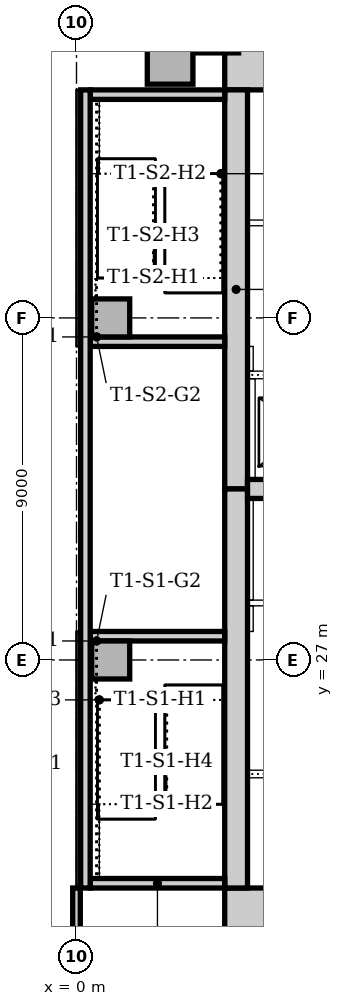
"""IFC4 building model, lengths in metres.
Left out: names, types, materials, properties, quantities, classifications, styles, units other than length and angle.
Written with IfcOpenShell. Run it as: python <this file> out.ifc"""

import sys

from ifc_helpers import new_model, si_unit, direction, frame, frame_2d, origin, origin_2d, place, context, subcontext, project, spatial, rectangle, extrude, element, fill, save


model = new_model("IFC4")
c1 = context("Model", 3, precision=1e-05, world=origin(), true_north=direction((0.0, 1.0)))
c2 = subcontext(c1, "Body", "Model", "MODEL_VIEW")
j1 = project(units=[si_unit("LENGTHUNIT", "METRE"), si_unit("PLANEANGLEUNIT", "RADIAN")], contexts=[c1])
p1 = place(None, origin())
s1 = spatial("IfcSite", under=j1, at=p1, CompositionType="ELEMENT")
p2 = place(p1, origin())
s2 = spatial("IfcBuilding", under=s1, at=p2, CompositionType="ELEMENT")
p3 = place(p2, frame((0.0, 0.0, 6.0)))
s3 = spatial("IfcBuildingStorey", under=s2, at=p3, CompositionType="ELEMENT", Elevation=6.0)
for number, where, z_axis, x_axis in (
    (1, (3.9, 20.4, 0.0), (0.0, 0.0, 1.0), (1.0, 0.0, 0.0)),
    (2, (23.7, 42.6, 0.0), (0.0, 0.0, 1.0), (-1.0, 0.0, 0.0)),
):
    element("IfcWall", number, at=place(p3, frame(where, z_axis=z_axis, x_axis=x_axis)), inside=s3, PredefinedType="SOLIDWALL", context=c2, shape_type="SweptSolid", body=[
        extrude(rectangle(XDim=19.8, YDim=1.2, at=frame_2d((9.9, 0.0))), origin(), (0.0, 0.0, 1.0), 5.0),
    ])
p4 = place(p3, frame((4.2, 42.0, 0.0), z_axis=(0.0, 0.0, 1.0), x_axis=(0.0, -1.0, 0.0)))
e3 = element("IfcWall", 3, at=p4, inside=s3, PredefinedType="SOLIDWALL", context=c2, shape_type="SweptSolid", body=[
    extrude(rectangle(XDim=10.5, YDim=0.6, at=frame_2d((5.25, 0.0))), origin(), (0.0, 0.0, 1.0), 5.0),
])
p5 = place(p4, frame((5.3, 0.0, 0.0)))
e4 = element("IfcOpeningElement", 4, at=p5, cuts=e3, PredefinedType="OPENING", context=c2, shape_type="SweptSolid", body=[
    extrude(rectangle(XDim=1.0, YDim=2.1, at=frame_2d((0.5, 1.05))), frame((0.0, 0.31, 0.0), z_axis=(0.0, -1.0, 0.0), x_axis=(1.0, 0.0, 0.0)), (0.0, 0.0, 1.0), 0.62),
])
p6 = place(p3, frame((4.2, 31.5, 0.0), z_axis=(0.0, 0.0, 1.0), x_axis=(0.0, -1.0, 0.0)))
e5 = element("IfcWall", 5, at=p6, inside=s3, PredefinedType="SOLIDWALL", context=c2, shape_type="SweptSolid", body=[
    extrude(rectangle(XDim=10.5, YDim=0.6, at=frame_2d((5.25, 0.0))), origin(), (0.0, 0.0, 1.0), 5.0),
])
p7 = place(p6, frame((4.25, 0.0, 0.0)))
e6 = element("IfcOpeningElement", 6, at=p7, cuts=e5, PredefinedType="OPENING", context=c2, shape_type="SweptSolid", body=[
    extrude(rectangle(XDim=1.0, YDim=2.1, at=frame_2d((0.5, 1.05))), frame((0.0, 0.31, 0.0), z_axis=(0.0, -1.0, 0.0), x_axis=(1.0, 0.0, 0.0)), (0.0, 0.0, 1.0), 0.62),
])
p8 = place(p3, frame((4.5, 31.5, 0.0), z_axis=(0.0, 0.0, 1.0), x_axis=(1.0, 0.0, 0.0)))
e7 = element("IfcWall", 7, at=p8, inside=s3, PredefinedType="SOLIDWALL", context=c2, shape_type="SweptSolid", body=[
    extrude(rectangle(XDim=18.0, YDim=0.5, at=frame_2d((9.0, 0.0))), origin(), (0.0, 0.0, 1.0), 5.0),
])
p9 = place(p3, frame((0.36, 21.125, 0.0), z_axis=(0.0, 0.0, 1.0), x_axis=(1.0, 0.0, 0.0)))
e8 = element("IfcWall", 8, at=p9, inside=s3, PredefinedType="SOLIDWALL", context=c2, shape_type="SweptSolid", body=[
    extrude(rectangle(XDim=3.54, YDim=0.25, at=frame_2d((1.77, 0.0))), origin(), (0.0, 0.0, 1.0), 5.0),
])
p10 = place(p3, frame((3.9, 27.625, 0.0), z_axis=(0.0, 0.0, 1.0), x_axis=(-1.0, 0.0, 0.0)))
e9 = element("IfcWall", 9, at=p10, inside=s3, PredefinedType="SOLIDWALL", context=c2, shape_type="SweptSolid", body=[
    extrude(rectangle(XDim=3.54, YDim=0.25, at=frame_2d((1.77, 0.0))), origin(), (0.0, 0.0, 1.0), 5.0),
])
p11 = place(p10, frame((0.4, 0.0, 0.0)))
e10 = element("IfcOpeningElement", 10, at=p11, cuts=e9, PredefinedType="OPENING", context=c2, shape_type="SweptSolid", body=[
    extrude(rectangle(XDim=1.0, YDim=2.1, at=frame_2d((0.5, 1.05))), frame((0.0, 0.135, 0.0), z_axis=(0.0, -1.0, 0.0), x_axis=(1.0, 0.0, 0.0)), (0.0, 0.0, 1.0), 0.27),
])
p12 = place(p3, frame((0.36, 35.375, 0.0), z_axis=(0.0, 0.0, 1.0), x_axis=(1.0, 0.0, 0.0)))
e11 = element("IfcWall", 11, at=p12, inside=s3, PredefinedType="SOLIDWALL", context=c2, shape_type="SweptSolid", body=[
    extrude(rectangle(XDim=3.54, YDim=0.25, at=frame_2d((1.77, 0.0))), origin(), (0.0, 0.0, 1.0), 5.0),
])
p13 = place(p12, frame((2.14, 0.0, 0.0)))
e12 = element("IfcOpeningElement", 12, at=p13, cuts=e11, PredefinedType="OPENING", context=c2, shape_type="SweptSolid", body=[
    extrude(rectangle(XDim=1.0, YDim=2.1, at=frame_2d((0.5, 1.05))), frame((0.0, 0.135, 0.0), z_axis=(0.0, -1.0, 0.0), x_axis=(1.0, 0.0, 0.0)), (0.0, 0.0, 1.0), 0.27),
])
p14 = place(p3, frame((3.9, 41.875, 0.0), z_axis=(0.0, 0.0, 1.0), x_axis=(-1.0, 0.0, 0.0)))
e13 = element("IfcWall", 13, at=p14, inside=s3, PredefinedType="SOLIDWALL", context=c2, shape_type="SweptSolid", body=[
    extrude(rectangle(XDim=3.54, YDim=0.25, at=frame_2d((1.77, 0.0))), origin(), (0.0, 0.0, 1.0), 5.0),
])
p15 = place(p3, frame((0.235, 21.0, 0.0), z_axis=(0.0, 0.0, 1.0), x_axis=(0.0, 1.0, 0.0)))
e14 = element("IfcWall", 14, at=p15, inside=s3, PredefinedType="SOLIDWALL", context=c2, shape_type="SweptSolid", body=[
    extrude(rectangle(XDim=21.0, YDim=0.25, at=frame_2d((10.5, 0.0))), origin(), (0.0, 0.0, 1.0), 5.0),
])
for number, where, z_axis, x_axis in (
    (15, (3.667, 43.574, 0.0), (0.0, 0.0, 1.0), (1.0, 0.0, 0.0)),
    (16, (2.463, 42.75, 0.0), (0.0, 0.0, 1.0), (1.0, 0.0, 0.0)),
):
    element("IfcColumn", number, at=place(p3, frame(where, z_axis=z_axis, x_axis=x_axis)), inside=s3, PredefinedType="COLUMN", context=c2, shape_type="SweptSolid", body=[
        extrude(rectangle(XDim=1.2, YDim=1.2, at=origin_2d()), origin(), (0.0, 0.0, 1.0), 4.7),
    ])
for number, where, z_axis, x_axis in (
    (17, (0.9, 27.0, 0.0), (0.0, 0.0, 1.0), (1.0, 0.0, 0.0)),
    (18, (0.9, 36.0, 0.0), (0.0, 0.0, 1.0), (1.0, 0.0, 0.0)),
):
    element("IfcColumn", number, at=place(p3, frame(where, z_axis=z_axis, x_axis=x_axis)), inside=s3, PredefinedType="COLUMN", context=c2, shape_type="SweptSolid", body=[
        extrude(rectangle(XDim=1.0, YDim=1.0, at=origin_2d()), origin(), (0.0, 0.0, 1.0), 5.0),
    ])
p16 = place(p3, frame((0.0, 3.7, 0.0), z_axis=(0.0, 0.0, 1.0), x_axis=(0.0, 1.0, 0.0)))
e19 = element("IfcWall", 19, at=p16, inside=s3, PredefinedType="PARTITIONING", context=c2, shape_type="SweptSolid", body=[
    extrude(rectangle(XDim=17.3, YDim=0.2, at=frame_2d((8.65, 0.0))), origin(), (0.0, 0.0, 1.0), 4.7),
])
p17 = place(p16, frame((8.1, 0.0, 0.0)))
e20 = element("IfcOpeningElement", 20, at=p17, cuts=e19, PredefinedType="OPENING", context=c2, shape_type="SweptSolid", body=[
    extrude(rectangle(XDim=1.0, YDim=2.1, at=frame_2d((0.5, 1.05))), frame((0.0, 0.11, 0.0), z_axis=(0.0, -1.0, 0.0), x_axis=(1.0, 0.0, 0.0)), (0.0, 0.0, 1.0), 0.22),
])
for number, where, z_axis, x_axis in (
    (21, (0.48, 21.25, 0.0), (0.0, 0.0, 1.0), (0.0, 1.0, 0.0)),
    (22, (0.48, 39.795, 0.0), (0.0, 0.0, 1.0), (0.0, 1.0, 0.0)),
):
    element("IfcWall", number, at=place(p3, frame(where, z_axis=z_axis, x_axis=x_axis)), inside=s3, PredefinedType="STANDARD", context=c2, shape_type="SweptSolid", body=[
        extrude(rectangle(XDim=1.955, YDim=0.24, at=frame_2d((0.978, 0.0))), origin(), (0.0, 0.0, 1.0), 5.0),
    ])
p18 = place(p3, frame((4.5, 24.0, 0.0), z_axis=(0.0, 0.0, 1.0), x_axis=(1.0, 0.0, 0.0)))
e23 = element("IfcWall", 23, at=p18, inside=s3, PredefinedType="PARTITIONING", context=c2, shape_type="SweptSolid", body=[
    extrude(rectangle(XDim=18.0, YDim=0.2, at=frame_2d((9.0, 0.0))), origin(), (0.0, 0.0, 1.0), 4.7),
])
p19 = place(p18, frame((0.95, 0.0, 0.0)))
e24 = element("IfcOpeningElement", 24, at=p19, cuts=e23, PredefinedType="OPENING", context=c2, shape_type="SweptSolid", body=[
    extrude(rectangle(XDim=1.1, YDim=2.1, at=frame_2d((0.55, 1.05))), frame((0.0, 0.11, 0.0), z_axis=(0.0, -1.0, 0.0), x_axis=(1.0, 0.0, 0.0)), (0.0, 0.0, 1.0), 0.22),
])
p20 = place(p18, frame((3.95, 0.0, 0.0)))
e25 = element("IfcOpeningElement", 25, at=p20, cuts=e23, PredefinedType="OPENING", context=c2, shape_type="SweptSolid", body=[
    extrude(rectangle(XDim=1.1, YDim=2.1, at=frame_2d((0.55, 1.05))), frame((0.0, 0.11, 0.0), z_axis=(0.0, -1.0, 0.0), x_axis=(1.0, 0.0, 0.0)), (0.0, 0.0, 1.0), 0.22),
])
p21 = place(p18, frame((6.95, 0.0, 0.0)))
e26 = element("IfcOpeningElement", 26, at=p21, cuts=e23, PredefinedType="OPENING", context=c2, shape_type="SweptSolid", body=[
    extrude(rectangle(XDim=1.1, YDim=2.1, at=frame_2d((0.55, 1.05))), frame((0.0, 0.11, 0.0), z_axis=(0.0, -1.0, 0.0), x_axis=(1.0, 0.0, 0.0)), (0.0, 0.0, 1.0), 0.22),
])
p22 = place(p18, frame((9.95, 0.0, 0.0)))
e27 = element("IfcOpeningElement", 27, at=p22, cuts=e23, PredefinedType="OPENING", context=c2, shape_type="SweptSolid", body=[
    extrude(rectangle(XDim=1.1, YDim=2.1, at=frame_2d((0.55, 1.05))), frame((0.0, 0.11, 0.0), z_axis=(0.0, -1.0, 0.0), x_axis=(1.0, 0.0, 0.0)), (0.0, 0.0, 1.0), 0.22),
])
p23 = place(p18, frame((12.95, 0.0, 0.0)))
e28 = element("IfcOpeningElement", 28, at=p23, cuts=e23, PredefinedType="OPENING", context=c2, shape_type="SweptSolid", body=[
    extrude(rectangle(XDim=1.1, YDim=2.1, at=frame_2d((0.55, 1.05))), frame((0.0, 0.11, 0.0), z_axis=(0.0, -1.0, 0.0), x_axis=(1.0, 0.0, 0.0)), (0.0, 0.0, 1.0), 0.22),
])
p24 = place(p18, frame((15.95, 0.0, 0.0)))
e29 = element("IfcOpeningElement", 29, at=p24, cuts=e23, PredefinedType="OPENING", context=c2, shape_type="SweptSolid", body=[
    extrude(rectangle(XDim=1.1, YDim=2.1, at=frame_2d((0.55, 1.05))), frame((0.0, 0.11, 0.0), z_axis=(0.0, -1.0, 0.0), x_axis=(1.0, 0.0, 0.0)), (0.0, 0.0, 1.0), 0.22),
])
p25 = place(p3, frame((4.5, 34.5, 0.0), z_axis=(0.0, 0.0, 1.0), x_axis=(1.0, 0.0, 0.0)))
e30 = element("IfcWall", 30, at=p25, inside=s3, PredefinedType="PARTITIONING", context=c2, shape_type="SweptSolid", body=[
    extrude(rectangle(XDim=18.0, YDim=0.2, at=frame_2d((9.0, 0.0))), origin(), (0.0, 0.0, 1.0), 4.7),
])
p26 = place(p25, frame((0.95, 0.0, 0.0)))
e31 = element("IfcOpeningElement", 31, at=p26, cuts=e30, PredefinedType="OPENING", context=c2, shape_type="SweptSolid", body=[
    extrude(rectangle(XDim=1.1, YDim=2.1, at=frame_2d((0.55, 1.05))), frame((0.0, 0.11, 0.0), z_axis=(0.0, -1.0, 0.0), x_axis=(1.0, 0.0, 0.0)), (0.0, 0.0, 1.0), 0.22),
])
p27 = place(p25, frame((3.95, 0.0, 0.0)))
e32 = element("IfcOpeningElement", 32, at=p27, cuts=e30, PredefinedType="OPENING", context=c2, shape_type="SweptSolid", body=[
    extrude(rectangle(XDim=1.1, YDim=2.1, at=frame_2d((0.55, 1.05))), frame((0.0, 0.11, 0.0), z_axis=(0.0, -1.0, 0.0), x_axis=(1.0, 0.0, 0.0)), (0.0, 0.0, 1.0), 0.22),
])
p28 = place(p25, frame((12.95, 0.0, 0.0)))
e33 = element("IfcOpeningElement", 33, at=p28, cuts=e30, PredefinedType="OPENING", context=c2, shape_type="SweptSolid", body=[
    extrude(rectangle(XDim=1.1, YDim=2.1, at=frame_2d((0.55, 1.05))), frame((0.0, 0.11, 0.0), z_axis=(0.0, -1.0, 0.0), x_axis=(1.0, 0.0, 0.0)), (0.0, 0.0, 1.0), 0.22),
])
p29 = place(p25, frame((15.95, 0.0, 0.0)))
e34 = element("IfcOpeningElement", 34, at=p29, cuts=e30, PredefinedType="OPENING", context=c2, shape_type="SweptSolid", body=[
    extrude(rectangle(XDim=1.1, YDim=2.1, at=frame_2d((0.55, 1.05))), frame((0.0, 0.11, 0.0), z_axis=(0.0, -1.0, 0.0), x_axis=(1.0, 0.0, 0.0)), (0.0, 0.0, 1.0), 0.22),
])
p30 = place(p3, frame((4.6, 31.75, 0.0), z_axis=(0.0, 0.0, 1.0), x_axis=(0.0, 1.0, 0.0)))
e35 = element("IfcWall", 35, at=p30, inside=s3, PredefinedType="PARTITIONING", context=c2, shape_type="SweptSolid", body=[
    extrude(rectangle(XDim=2.65, YDim=0.2, at=frame_2d((1.325, 0.0))), origin(), (0.0, 0.0, 1.0), 4.7),
])
p31 = place(p3, frame((4.5, 28.5, 0.0), z_axis=(0.0, 0.0, 1.0), x_axis=(1.0, 0.0, 0.0)))
e36 = element("IfcWall", 36, at=p31, inside=s3, PredefinedType="PARTITIONING", context=c2, shape_type="SweptSolid", body=[
    extrude(rectangle(XDim=18.0, YDim=0.15, at=frame_2d((9.0, 0.0))), origin(), (0.0, 0.0, 1.0), 4.7),
])
p32 = place(p31, frame((4.1, 0.0, 0.0)))
e37 = element("IfcOpeningElement", 37, at=p32, cuts=e36, PredefinedType="OPENING", context=c2, shape_type="SweptSolid", body=[
    extrude(rectangle(XDim=0.9, YDim=2.1, at=frame_2d((0.45, 1.05))), frame((0.0, 0.085, 0.0), z_axis=(0.0, -1.0, 0.0), x_axis=(1.0, 0.0, 0.0)), (0.0, 0.0, 1.0), 0.17),
])
p33 = place(p31, frame((10.8, 0.0, 0.0)))
e38 = element("IfcOpeningElement", 38, at=p33, cuts=e36, PredefinedType="OPENING", context=c2, shape_type="SweptSolid", body=[
    extrude(rectangle(XDim=0.9, YDim=2.1, at=frame_2d((0.45, 1.05))), frame((0.0, 0.085, 0.0), z_axis=(0.0, -1.0, 0.0), x_axis=(1.0, 0.0, 0.0)), (0.0, 0.0, 1.0), 0.17),
])
p34 = place(p31, frame((15.2, 0.0, 0.0)))
e39 = element("IfcOpeningElement", 39, at=p34, cuts=e36, PredefinedType="OPENING", context=c2, shape_type="SweptSolid", body=[
    extrude(rectangle(XDim=0.9, YDim=2.1, at=frame_2d((0.45, 1.05))), frame((0.0, 0.085, 0.0), z_axis=(0.0, -1.0, 0.0), x_axis=(1.0, 0.0, 0.0)), (0.0, 0.0, 1.0), 0.17),
])
p35 = place(p3, frame((4.5, 38.5, 0.0), z_axis=(0.0, 0.0, 1.0), x_axis=(1.0, 0.0, 0.0)))
e40 = element("IfcWall", 40, at=p35, inside=s3, PredefinedType="PARTITIONING", context=c2, shape_type="SweptSolid", body=[
    extrude(rectangle(XDim=11.9, YDim=0.15, at=frame_2d((5.95, 0.0))), origin(), (0.0, 0.0, 1.0), 4.7),
])
p36 = place(p35, frame((1.1, 0.0, 0.0)))
e41 = element("IfcOpeningElement", 41, at=p36, cuts=e40, PredefinedType="OPENING", context=c2, shape_type="SweptSolid", body=[
    extrude(rectangle(XDim=0.9, YDim=2.1, at=frame_2d((0.45, 1.05))), frame((0.0, 0.085, 0.0), z_axis=(0.0, -1.0, 0.0), x_axis=(1.0, 0.0, 0.0)), (0.0, 0.0, 1.0), 0.17),
])
p37 = place(p35, frame((4.05, 0.0, 0.0)))
e42 = element("IfcOpeningElement", 42, at=p37, cuts=e40, PredefinedType="OPENING", context=c2, shape_type="SweptSolid", body=[
    extrude(rectangle(XDim=0.9, YDim=2.1, at=frame_2d((0.45, 1.05))), frame((0.0, 0.085, 0.0), z_axis=(0.0, -1.0, 0.0), x_axis=(1.0, 0.0, 0.0)), (0.0, 0.0, 1.0), 0.17),
])
p38 = place(p35, frame((7.05, 0.0, 0.0)))
e43 = element("IfcOpeningElement", 43, at=p38, cuts=e40, PredefinedType="OPENING", context=c2, shape_type="SweptSolid", body=[
    extrude(rectangle(XDim=0.9, YDim=2.1, at=frame_2d((0.45, 1.05))), frame((0.0, 0.085, 0.0), z_axis=(0.0, -1.0, 0.0), x_axis=(1.0, 0.0, 0.0)), (0.0, 0.0, 1.0), 0.17),
])
p39 = place(p35, frame((9.95, 0.0, 0.0)))
e44 = element("IfcOpeningElement", 44, at=p39, cuts=e40, PredefinedType="OPENING", context=c2, shape_type="SweptSolid", body=[
    extrude(rectangle(XDim=0.8, YDim=2.1, at=frame_2d((0.4, 1.05))), frame((0.0, 0.085, 0.0), z_axis=(0.0, -1.0, 0.0), x_axis=(1.0, 0.0, 0.0)), (0.0, 0.0, 1.0), 0.17),
])
p40 = place(p3, frame((4.575, 27.75, 0.0), z_axis=(0.0, 0.0, 1.0), x_axis=(0.0, 1.0, 0.0)))
e45 = element("IfcWall", 45, at=p40, inside=s3, PredefinedType="PARTITIONING", context=c2, shape_type="SweptSolid", body=[
    extrude(rectangle(XDim=0.675, YDim=0.15, at=frame_2d((0.338, 0.0))), origin(), (0.0, 0.0, 1.0), 4.7),
])
p41 = place(p3, frame((4.575, 28.575, 0.0), z_axis=(0.0, 0.0, 1.0), x_axis=(0.0, 1.0, 0.0)))
e46 = element("IfcWall", 46, at=p41, inside=s3, PredefinedType="PARTITIONING", context=c2, shape_type="SweptSolid", body=[
    extrude(rectangle(XDim=2.675, YDim=0.15, at=frame_2d((1.337, 0.0))), origin(), (0.0, 0.0, 1.0), 4.7),
])
p42 = place(p3, frame((4.575, 34.6, 0.0), z_axis=(0.0, 0.0, 1.0), x_axis=(0.0, 1.0, 0.0)))
e47 = element("IfcWall", 47, at=p42, inside=s3, PredefinedType="PARTITIONING", context=c2, shape_type="SweptSolid", body=[
    extrude(rectangle(XDim=0.65, YDim=0.15, at=frame_2d((0.325, 0.0))), origin(), (0.0, 0.0, 1.0), 4.7),
])
p43 = place(p7, frame((1.0, 0.0, 0.0), z_axis=(0.0, 0.0, 1.0), x_axis=(-1.0, 0.0, 0.0)))
e48 = element("IfcDoor", 48, at=p43, inside=s3, OperationType="SINGLE_SWING_RIGHT", PredefinedType="DOOR", context=c2, shape_type="SweptSolid", body=[
    extrude(rectangle(XDim=1.0, YDim=2.1, at=frame_2d((0.5, 1.05))), frame((0.0, 0.025, 0.0), z_axis=(0.0, -1.0, 0.0), x_axis=(1.0, 0.0, 0.0)), (0.0, 0.0, 1.0), 0.05),
])
fill(e6, e48)
p44 = place(p11, origin())
e49 = element("IfcDoor", 49, at=p44, inside=s3, OperationType="SINGLE_SWING_LEFT", PredefinedType="DOOR", context=c2, shape_type="SweptSolid", body=[
    extrude(rectangle(XDim=1.0, YDim=2.1, at=frame_2d((0.5, 1.05))), frame((0.0, 0.025, 0.0), z_axis=(0.0, -1.0, 0.0), x_axis=(1.0, 0.0, 0.0)), (0.0, 0.0, 1.0), 0.05),
])
fill(e10, e49)
p45 = place(p5, frame((1.0, 0.0, 0.0), z_axis=(0.0, 0.0, 1.0), x_axis=(-1.0, 0.0, 0.0)))
e50 = element("IfcDoor", 50, at=p45, inside=s3, OperationType="SINGLE_SWING_LEFT", PredefinedType="DOOR", context=c2, shape_type="SweptSolid", body=[
    extrude(rectangle(XDim=1.0, YDim=2.1, at=frame_2d((0.5, 1.05))), frame((0.0, 0.025, 0.0), z_axis=(0.0, -1.0, 0.0), x_axis=(1.0, 0.0, 0.0)), (0.0, 0.0, 1.0), 0.05),
])
fill(e4, e50)
p46 = place(p13, origin())
e51 = element("IfcDoor", 51, at=p46, inside=s3, OperationType="SINGLE_SWING_RIGHT", PredefinedType="DOOR", context=c2, shape_type="SweptSolid", body=[
    extrude(rectangle(XDim=1.0, YDim=2.1, at=frame_2d((0.5, 1.05))), frame((0.0, 0.025, 0.0), z_axis=(0.0, -1.0, 0.0), x_axis=(1.0, 0.0, 0.0)), (0.0, 0.0, 1.0), 0.05),
])
fill(e12, e51)
save(model, sys.argv[1])
